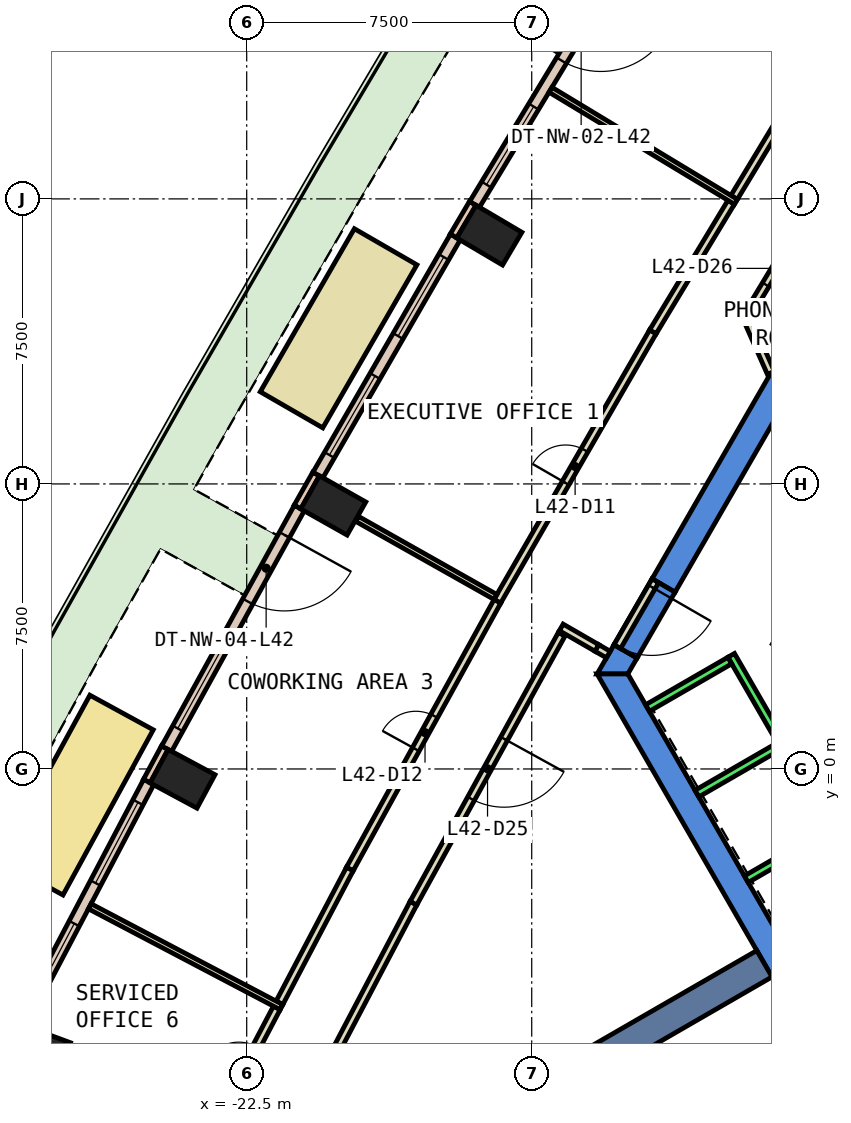
"""IFC4 building model, lengths in metres.
Left out: names, types, materials, properties, quantities, classifications, styles, units other than length and angle.
Written with IfcOpenShell. Run it as: python <this file> out.ifc"""

import sys

from ifc_helpers import new_model, si_unit, direction, frame, frame_2d, origin, origin_2d, place, context, subcontext, project, spatial, polyline, rectangle, outline, extrude, element, fill, save


model = new_model("IFC4")
c1 = context("Model", 3, precision=1e-05, world=origin(), true_north=direction((0.0, 1.0)))
c2 = subcontext(c1, "Body", "Model", "MODEL_VIEW")
j1 = project(units=[si_unit("LENGTHUNIT", "METRE"), si_unit("PLANEANGLEUNIT", "RADIAN")], contexts=[c1])
p1 = place(None, origin())
s1 = spatial("IfcSite", under=j1, at=p1, CompositionType="ELEMENT")
p2 = place(p1, origin())
s2 = spatial("IfcBuilding", under=s1, at=p2, CompositionType="ELEMENT")
p3 = place(p2, frame((0.0, 0.0, 189.8)))
s3 = spatial("IfcBuildingStorey", under=s2, at=p3, CompositionType="ELEMENT", Elevation=189.8)
for number, where, z_axis, x_axis in (
    (1, (-16.116, 14.046, 0.0), (0.0, 0.0, 1.0), (0.509, 0.861, 0.0)),
    (2, (-20.222, 6.934, 0.0), (0.0, 0.0, 1.0), (0.491, 0.871, 0.0)),
    (3, (-24.188, -0.259, 0.0), (0.0, 0.0, 1.0), (0.474, 0.88, 0.0)),
    (4, (-27.967, -7.429, 0.0), (0.0, 0.0, 1.0), (0.347, 0.938, 0.0)),
):
    element("IfcColumn", number, at=place(p3, frame(where, z_axis=z_axis, x_axis=x_axis)), inside=s3, PredefinedType="COLUMN", context=c2, shape_type="SweptSolid", body=[
        extrude(rectangle(XDim=1.0, YDim=1.4, at=origin_2d()), origin(), (0.0, 0.0, 1.0), 3.8),
    ])
p4 = place(p3, frame((0.0, 0.0, -0.6)))
e5 = element("IfcWall", 5, at=p4, inside=s3, PredefinedType="SHEAR", context=c2, shape_type="SweptSolid", body=[
    extrude(outline(polyline([(-11.834, 5.002), (-11.228, 4.652), (-6.235, 13.3), (-6.64, 14.0), (-11.834, 5.002)])), origin(), (0.0, 0.0, 1.0), 4.4),
])
p5 = place(p3, frame((0.0, 0.0, -0.6)))
e6 = element("IfcWall", 6, at=p5, inside=s3, PredefinedType="SHEAR", context=c2, shape_type="SweptSolid", body=[
    extrude(outline(polyline([(-12.228, 2.92), (-12.834, 3.27), (-13.279, 2.5), (-12.471, 2.5), (-12.228, 2.92)])), origin(), (0.0, 0.0, 1.0), 4.4),
])
p6 = place(p3, frame((0.0, 0.0, 3.6)))
e7 = element("IfcWall", 7, at=p6, inside=s3, PredefinedType="SHEAR", context=c2, shape_type="SweptSolid", body=[
    extrude(outline(polyline([(-12.834, 3.27), (-12.228, 2.92), (-11.228, 4.652), (-11.834, 5.002), (-12.834, 3.27)])), origin(), (0.0, 0.0, 1.0), 0.2),
])
p7 = place(p3, frame((0.0, 0.0, -0.6)))
e8 = element("IfcWall", 8, at=p7, inside=s3, PredefinedType="SHEAR", context=c2, shape_type="SweptSolid", body=[
    extrude(outline(polyline([(-13.279, 2.5), (-6.64, -9.0), (-6.235, -8.3), (-12.471, 2.5), (-13.279, 2.5)])), origin(), (0.0, 0.0, 1.0), 4.4),
])
p8 = place(p3, frame((-8.877, -5.125, -0.6), z_axis=(0.0, 0.0, 1.0), x_axis=(-0.866017533419, -0.500013631625, 0.0)))
e9 = element("IfcWall", 9, at=p8, inside=s3, PredefinedType="SHEAR", context=c2, shape_type="SweptSolid", body=[
    extrude(rectangle(XDim=9.0, YDim=0.8, at=frame_2d((4.5, 0.0))), origin(), (0.0, 0.0, 1.0), 4.4),
])
p9 = place(p3, frame((-16.551, 14.884, 0.0), z_axis=(0.0, 0.0, 1.0), x_axis=(-0.508161541526, -0.861261776531, 0.0)))
e10 = element("IfcWall", 10, at=p9, inside=s3, PredefinedType="STANDARD", context=c2, shape_type="SweptSolid", body=[
    extrude(rectangle(XDim=1.0, YDim=0.2, at=frame_2d((0.5, 0.0))), origin(), (0.0, 0.0, 1.0), 3.8),
])
p10 = place(p3, frame((-20.673, 7.762, 0.0), z_axis=(0.0, 0.0, 1.0), x_axis=(-0.491848119507, -0.870681013539, 0.0)))
e11 = element("IfcWall", 11, at=p10, inside=s3, PredefinedType="STANDARD", context=c2, shape_type="SweptSolid", body=[
    extrude(rectangle(XDim=1.0, YDim=0.2, at=frame_2d((0.5, 0.0))), origin(), (0.0, 0.0, 1.0), 3.8),
])
p11 = place(p3, frame((-24.655, 0.561, 0.0), z_axis=(0.0, 0.0, 1.0), x_axis=(-0.473663196434, -0.88070606694, 0.0)))
e12 = element("IfcWall", 12, at=p11, inside=s3, PredefinedType="STANDARD", context=c2, shape_type="SweptSolid", body=[
    extrude(rectangle(XDim=1.0, YDim=0.2, at=frame_2d((0.5, 0.0))), origin(), (0.0, 0.0, 1.0), 3.8),
])
p12 = place(p3, frame((-12.765, 21.043, 0.0), z_axis=(0.0, 0.0, 1.0), x_axis=(-0.517159962006, -0.855888762456, 0.0)))
e13 = element("IfcWall", 13, at=p12, inside=s3, PredefinedType="STANDARD", context=c2, shape_type="SweptSolid", body=[
    extrude(rectangle(XDim=7.23, YDim=0.3, at=frame_2d((3.615, 0.0))), origin(), (0.0, 0.0, 1.0), 3.8),
])
p13 = place(p12, frame((0.807, 0.0, 0.0)))
e14 = element("IfcOpeningElement", 14, at=p13, cuts=e13, PredefinedType="OPENING", context=c2, shape_type="SweptSolid", body=[
    extrude(rectangle(XDim=2.0, YDim=2.4, at=frame_2d((1.0, 1.2))), frame((0.0, 0.16, 0.0), z_axis=(0.0, -1.0, 0.0), x_axis=(1.0, 0.0, 0.0)), (0.0, 0.0, 1.0), 0.32),
])
p14 = place(p12, frame((4.222, 0.0, 0.9)))
e15 = element("IfcOpeningElement", 15, at=p14, cuts=e13, PredefinedType="OPENING", context=c2, shape_type="SweptSolid", body=[
    extrude(rectangle(XDim=2.4, YDim=2.6, at=frame_2d((1.2, 1.3))), frame((0.0, 0.16, 0.0), z_axis=(0.0, -1.0, 0.0), x_axis=(1.0, 0.0, 0.0)), (0.0, 0.0, 1.0), 0.32),
])
p15 = place(p3, frame((-17.011, 13.996, 0.0), z_axis=(0.0, 0.0, 1.0), x_axis=(-0.499948481376, -0.866055146033, 0.0)))
e16 = element("IfcWall", 16, at=p15, inside=s3, PredefinedType="STANDARD", context=c2, shape_type="SweptSolid", body=[
    extrude(rectangle(XDim=7.231, YDim=0.3, at=frame_2d((3.615, 0.0))), origin(), (0.0, 0.0, 1.0), 3.8),
])
p16 = place(p15, frame((0.608, 0.0, 0.9)))
e17 = element("IfcOpeningElement", 17, at=p16, cuts=e16, PredefinedType="OPENING", context=c2, shape_type="SweptSolid", body=[
    extrude(rectangle(XDim=2.4, YDim=2.6, at=frame_2d((1.2, 1.3))), frame((0.0, 0.16, 0.0), z_axis=(0.0, -1.0, 0.0), x_axis=(1.0, 0.0, 0.0)), (0.0, 0.0, 1.0), 0.32),
])
p17 = place(p15, frame((4.223, 0.0, 0.9)))
e18 = element("IfcOpeningElement", 18, at=p17, cuts=e16, PredefinedType="OPENING", context=c2, shape_type="SweptSolid", body=[
    extrude(rectangle(XDim=2.4, YDim=2.6, at=frame_2d((1.2, 1.3))), frame((0.0, 0.16, 0.0), z_axis=(0.0, -1.0, 0.0), x_axis=(1.0, 0.0, 0.0)), (0.0, 0.0, 1.0), 0.32),
])
p18 = place(p3, frame((-21.116, 6.865, 0.0), z_axis=(0.0, 0.0, 1.0), x_axis=(-0.482862185961, -0.875696356832, 0.0)))
e19 = element("IfcWall", 19, at=p18, inside=s3, PredefinedType="STANDARD", context=c2, shape_type="SweptSolid", body=[
    extrude(rectangle(XDim=7.23, YDim=0.3, at=frame_2d((3.615, 0.0))), origin(), (0.0, 0.0, 1.0), 3.8),
])
p19 = place(p18, frame((0.807, 0.0, 0.0)))
e20 = element("IfcOpeningElement", 20, at=p19, cuts=e19, PredefinedType="OPENING", context=c2, shape_type="SweptSolid", body=[
    extrude(rectangle(XDim=2.0, YDim=2.4, at=frame_2d((1.0, 1.2))), frame((0.0, 0.16, 0.0), z_axis=(0.0, -1.0, 0.0), x_axis=(1.0, 0.0, 0.0)), (0.0, 0.0, 1.0), 0.32),
])
p20 = place(p18, frame((4.222, 0.0, 0.9)))
e21 = element("IfcOpeningElement", 21, at=p20, cuts=e19, PredefinedType="OPENING", context=c2, shape_type="SweptSolid", body=[
    extrude(rectangle(XDim=2.4, YDim=2.6, at=frame_2d((1.2, 1.3))), frame((0.0, 0.16, 0.0), z_axis=(0.0, -1.0, 0.0), x_axis=(1.0, 0.0, 0.0)), (0.0, 0.0, 1.0), 0.32),
])
p21 = place(p3, frame((-25.08, -0.345, 0.0), z_axis=(0.0, 0.0, 1.0), x_axis=(-0.465478369088, -0.885059256723, 0.0)))
e22 = element("IfcWall", 22, at=p21, inside=s3, PredefinedType="STANDARD", context=c2, shape_type="SweptSolid", body=[
    extrude(rectangle(XDim=7.208, YDim=0.3, at=frame_2d((3.604, 0.0))), origin(), (0.0, 0.0, 1.0), 3.8),
])
p22 = place(p21, frame((0.602, 0.0, 0.9)))
e23 = element("IfcOpeningElement", 23, at=p22, cuts=e22, PredefinedType="OPENING", context=c2, shape_type="SweptSolid", body=[
    extrude(rectangle(XDim=2.4, YDim=2.6, at=frame_2d((1.2, 1.3))), frame((0.0, 0.16, 0.0), z_axis=(0.0, -1.0, 0.0), x_axis=(1.0, 0.0, 0.0)), (0.0, 0.0, 1.0), 0.32),
])
p23 = place(p21, frame((4.206, 0.0, 0.9)))
e24 = element("IfcOpeningElement", 24, at=p23, cuts=e22, PredefinedType="OPENING", context=c2, shape_type="SweptSolid", body=[
    extrude(rectangle(XDim=2.4, YDim=2.6, at=frame_2d((1.2, 1.3))), frame((0.0, 0.16, 0.0), z_axis=(0.0, -1.0, 0.0), x_axis=(1.0, 0.0, 0.0)), (0.0, 0.0, 1.0), 0.32),
])
p24 = place(p3, frame((-18.844, 13.74, 0.0), z_axis=(0.0, 0.0, 1.0), x_axis=(-0.500029609304, -0.86600830817, 0.0)))
e25 = element("IfcWall", 25, at=p24, inside=s3, PredefinedType="STANDARD", context=c2, shape_type="SweptSolid", body=[
    extrude(rectangle(XDim=4.954, YDim=1.9, at=frame_2d((2.477, 0.0))), origin(), (0.0, 0.0, 1.0), 0.8),
])
p25 = place(p3, frame((-25.793, 1.486, 0.0), z_axis=(0.0, 0.0, 1.0), x_axis=(-0.479445954257, -0.87757140846, 0.0)))
e26 = element("IfcWall", 26, at=p25, inside=s3, PredefinedType="STANDARD", context=c2, shape_type="SweptSolid", body=[
    extrude(rectangle(XDim=4.954, YDim=1.9, at=frame_2d((2.477, 0.0))), origin(), (0.0, 0.0, 1.0), 0.8),
])
p26 = place(p3, frame((-7.759, 14.536, 0.0), z_axis=(0.0, 0.0, 1.0), x_axis=(-0.516926279395, -0.856029918678, 0.0)))
e27 = element("IfcWall", 27, at=p26, inside=s3, PredefinedType="PARTITIONING", context=c2, shape_type="SweptSolid", body=[
    extrude(rectangle(XDim=3.188, YDim=0.2, at=frame_2d((1.594, 0.0))), origin(), (0.0, 0.0, 1.0), 3.8),
])
p27 = place(p26, frame((1.094, 0.0, 0.0)))
e28 = element("IfcOpeningElement", 28, at=p27, cuts=e27, PredefinedType="OPENING", context=c2, shape_type="SweptSolid", body=[
    extrude(rectangle(XDim=1.0, YDim=2.1, at=frame_2d((0.5, 1.05))), frame((0.0, 0.11, 0.0), z_axis=(0.0, -1.0, 0.0), x_axis=(1.0, 0.0, 0.0)), (0.0, 0.0, 1.0), 0.22),
])
p28 = place(p3, frame((-9.315, 11.801, 0.0), z_axis=(0.0, 0.0, 1.0), x_axis=(0.403943240321, -0.914784050254, 0.0)))
e29 = element("IfcWall", 29, at=p28, inside=s3, PredefinedType="PARTITIONING", context=c2, shape_type="SweptSolid", body=[
    extrude(rectangle(XDim=1.507, YDim=0.2, at=frame_2d((0.754, 0.0))), origin(), (0.0, 0.0, 1.0), 3.8),
])
p29 = place(p3, frame((-18.112, -3.531, 0.0), z_axis=(0.0, 0.0, 1.0), x_axis=(-0.465461327558, -0.885068219149, 0.0)))
e30 = element("IfcWall", 30, at=p29, inside=s3, PredefinedType="PARTITIONING", context=c2, shape_type="SweptSolid", body=[
    extrude(rectangle(XDim=7.236, YDim=0.2, at=frame_2d((3.618, 0.0))), origin(), (0.0, 0.0, 1.0), 3.8),
])
p30 = place(p3, frame((-12.984, 3.01, 0.0), z_axis=(0.0, 0.0, 1.0), x_axis=(-0.866046247233, 0.49996389635, 0.0)))
e31 = element("IfcWall", 31, at=p30, inside=s3, PredefinedType="PARTITIONING", context=c2, shape_type="SweptSolid", body=[
    extrude(rectangle(XDim=0.35, YDim=0.2, at=frame_2d((0.175, 0.0))), origin(), (0.0, 0.0, 1.0), 2.4),
])
p31 = place(p3, frame((-14.213, 3.543, 0.0), z_axis=(0.0, 0.0, 1.0), x_axis=(-0.482724934882, -0.875772023556, 0.0)))
e32 = element("IfcWall", 32, at=p31, inside=s3, PredefinedType="PARTITIONING", context=c2, shape_type="SweptSolid", body=[
    extrude(rectangle(XDim=8.077, YDim=0.2, at=frame_2d((4.039, 0.0))), origin(), (0.0, 0.0, 1.0), 3.8),
])
p32 = place(p31, frame((3.139, 0.0, 0.0)))
e33 = element("IfcOpeningElement", 33, at=p32, cuts=e32, PredefinedType="OPENING", context=c2, shape_type="SweptSolid", body=[
    extrude(rectangle(XDim=1.8, YDim=2.1, at=frame_2d((0.9, 1.05))), frame((0.0, 0.11, 0.0), z_axis=(0.0, -1.0, 0.0), x_axis=(1.0, 0.0, 0.0)), (0.0, 0.0, 1.0), 0.22),
])
p33 = place(p3, frame((-9.674, 15.039, 0.0), z_axis=(0.0, 0.0, 1.0), x_axis=(0.516918251554, 0.856034766356, 0.0)))
e34 = element("IfcWall", 34, at=p33, inside=s3, PredefinedType="PARTITIONING", context=c2, shape_type="SweptSolid", body=[
    extrude(rectangle(XDim=3.983, YDim=0.2, at=frame_2d((1.992, 0.0))), origin(), (0.0, 0.0, 1.0), 3.8),
])
p34 = place(p3, frame((-15.905, 4.412, 0.0), z_axis=(0.0, 0.0, 1.0), x_axis=(0.5000098125, 0.866019738461, 0.0)))
e35 = element("IfcWall", 35, at=p34, inside=s3, PredefinedType="PARTITIONING", context=c2, shape_type="SweptSolid", body=[
    extrude(rectangle(XDim=8.188, YDim=0.2, at=frame_2d((4.094, 0.0))), origin(), (0.0, 0.0, 1.0), 3.8),
])
p35 = place(p34, frame((3.594, 0.0, 0.0)))
e36 = element("IfcOpeningElement", 36, at=p35, cuts=e35, PredefinedType="OPENING", context=c2, shape_type="SweptSolid", body=[
    extrude(rectangle(XDim=1.0, YDim=2.1, at=frame_2d((0.5, 1.05))), frame((0.0, 0.11, 0.0), z_axis=(0.0, -1.0, 0.0), x_axis=(1.0, 0.0, 0.0)), (0.0, 0.0, 1.0), 0.22),
])
for number, where, z_axis, x_axis in (
    (37, (-11.811, 11.503, 0.0), (0.0, 0.0, 1.0), (0.517, 0.856, 0.0)),
    (38, (-21.638, -6.154, 0.0), (0.0, 0.0, 1.0), (0.465, 0.885, 0.0)),
):
    element("IfcWall", number, at=place(p3, frame(where, z_axis=z_axis, x_axis=x_axis)), inside=s3, PredefinedType="PARTITIONING", context=c2, shape_type="SweptSolid", body=[
        extrude(rectangle(XDim=3.982, YDim=0.2, at=frame_2d((1.991, 0.0))), origin(), (0.0, 0.0, 1.0), 3.8),
    ])
p36 = place(p3, frame((-19.785, -2.63, 0.0), z_axis=(0.0, 0.0, 1.0), x_axis=(0.482817232578, 0.875721142788, 0.0)))
e39 = element("IfcWall", 39, at=p36, inside=s3, PredefinedType="PARTITIONING", context=c2, shape_type="SweptSolid", body=[
    extrude(rectangle(XDim=8.04, YDim=0.2, at=frame_2d((4.02, 0.0))), origin(), (0.0, 0.0, 1.0), 3.8),
])
p37 = place(p36, frame((3.595, 0.0, 0.0)))
e40 = element("IfcOpeningElement", 40, at=p37, cuts=e39, PredefinedType="OPENING", context=c2, shape_type="SweptSolid", body=[
    extrude(rectangle(XDim=1.0, YDim=2.1, at=frame_2d((0.5, 1.05))), frame((0.0, 0.11, 0.0), z_axis=(0.0, -1.0, 0.0), x_axis=(1.0, 0.0, 0.0)), (0.0, 0.0, 1.0), 0.22),
])
p38 = place(p3, frame((-23.242, -9.204, 0.0), z_axis=(0.0, 0.0, 1.0), x_axis=(0.465431933571, 0.885083676955, 0.0)))
e41 = element("IfcWall", 41, at=p38, inside=s3, PredefinedType="PARTITIONING", context=c2, shape_type="SweptSolid", body=[
    extrude(rectangle(XDim=3.296, YDim=0.2, at=frame_2d((1.648, 0.0))), origin(), (0.0, 0.0, 1.0), 3.8),
])
p39 = place(p38, frame((1.148, 0.0, 0.0)))
e42 = element("IfcOpeningElement", 42, at=p39, cuts=e41, PredefinedType="OPENING", context=c2, shape_type="SweptSolid", body=[
    extrude(rectangle(XDim=1.0, YDim=2.1, at=frame_2d((0.5, 1.05))), frame((0.0, 0.11, 0.0), z_axis=(0.0, -1.0, 0.0), x_axis=(1.0, 0.0, 0.0)), (0.0, 0.0, 1.0), 0.22),
])
p40 = place(p3, frame((-9.628, 14.924, 0.0), z_axis=(0.0, 0.0, 1.0), x_axis=(-0.855931736607, 0.517088834021, 0.0)))
e43 = element("IfcWall", 43, at=p40, inside=s3, PredefinedType="PARTITIONING", context=c2, shape_type="SweptSolid", body=[
    extrude(rectangle(XDim=5.699, YDim=0.15, at=frame_2d((2.85, 0.0))), origin(), (0.0, 0.0, 1.0), 3.8),
])
p41 = place(p3, frame((-15.954, 4.526, 0.0), z_axis=(0.0, 0.0, 1.0), x_axis=(-0.870940016277, 0.491389344663, 0.0)))
e44 = element("IfcWall", 44, at=p41, inside=s3, PredefinedType="PARTITIONING", context=c2, shape_type="SweptSolid", body=[
    extrude(rectangle(XDim=4.18, YDim=0.15, at=frame_2d((2.09, 0.0))), origin(), (0.0, 0.0, 1.0), 3.8),
])
p42 = place(p3, frame((-21.585, -6.267, 0.0), z_axis=(0.0, 0.0, 1.0), x_axis=(-0.885073333504, 0.465451602554, 0.0)))
e45 = element("IfcWall", 45, at=p42, inside=s3, PredefinedType="PARTITIONING", context=c2, shape_type="SweptSolid", body=[
    extrude(rectangle(XDim=5.7, YDim=0.15, at=frame_2d((2.85, 0.0))), origin(), (0.0, 0.0, 1.0), 3.8),
])
p43 = place(p3, frame((-11.747, 4.952, 0.0), z_axis=(0.0, 0.0, 1.0), x_axis=(-0.50002537861, -0.866010750942, 0.0)))
e46 = element("IfcWall", 46, at=p43, inside=s3, PredefinedType="PARTITIONING", context=c2, shape_type="SweptSolid", body=[
    extrude(rectangle(XDim=2.0, YDim=0.2, at=frame_2d((1.0, 0.0))), origin(), (0.0, 0.0, 1.0), 2.4),
])
p44 = place(p43, frame((0.19, 0.0, 0.0)))
e47 = element("IfcOpeningElement", 47, at=p44, cuts=e46, PredefinedType="OPENING", context=c2, shape_type="SweptSolid", body=[
    extrude(rectangle(XDim=1.8, YDim=2.1, at=frame_2d((0.9, 1.05))), frame((0.0, 0.11, 0.0), z_axis=(0.0, -1.0, 0.0), x_axis=(1.0, 0.0, 0.0)), (0.0, 0.0, 1.0), 0.22),
])
p45 = place(p3, frame((-13.287, 3.185, 0.0), z_axis=(0.0, 0.0, 1.0), x_axis=(-0.866121626761, 0.499833299868, 0.0)))
e48 = element("IfcWall", 48, at=p45, inside=s3, PredefinedType="PARTITIONING", context=c2, shape_type="SweptSolid", body=[
    extrude(rectangle(XDim=1.08, YDim=0.2, at=frame_2d((0.54, 0.0))), origin(), (0.0, 0.0, 1.0), 3.8),
])
p46 = place(p3, frame((-9.751, 2.99, 0.0), z_axis=(0.0, 0.0, 1.0), x_axis=(0.50000090737, -0.866024879913, 0.0)))
e49 = element("IfcWall", 49, at=p46, inside=s3, PredefinedType="STANDARD", context=c2, shape_type="SweptSolid", body=[
    extrude(rectangle(XDim=10.6, YDim=0.2, at=frame_2d((5.3, 0.0))), origin(), (0.0, 0.0, 1.0), 3.8),
])
p47 = place(p3, frame((-9.788, 2.853, 0.0), z_axis=(0.0, 0.0, 1.0), x_axis=(-0.865998541277, -0.500046524342, 0.0)))
e50 = element("IfcWall", 50, at=p47, inside=s3, PredefinedType="STANDARD", context=c2, shape_type="SweptSolid", body=[
    extrude(rectangle(XDim=2.5, YDim=0.2, at=frame_2d((1.25, 0.0))), origin(), (0.0, 0.0, 1.0), 3.8),
])
for number, where, z_axis, x_axis in (
    (51, (-8.488, 0.602, 0.0), (0.0, 0.0, 1.0), (-0.866, -0.5, 0.0)),
    (52, (-7.188, -1.65, 0.0), (0.0, 0.0, 1.0), (-0.866, -0.5, 0.0)),
):
    element("IfcWall", number, at=place(p3, frame(where, z_axis=z_axis, x_axis=x_axis)), inside=s3, PredefinedType="STANDARD", context=c2, shape_type="SweptSolid", body=[
        extrude(rectangle(XDim=2.5, YDim=0.2, at=frame_2d((1.25, 0.0))), origin(), (0.0, 0.0, 1.0), 3.8),
    ])
p48 = place(p13, origin())
e53 = element("IfcDoor", 53, at=p48, inside=s3, OperationType="SLIDING_TO_LEFT", PredefinedType="DOOR", context=c2, shape_type="SweptSolid", body=[
    extrude(rectangle(XDim=2.0, YDim=2.4, at=frame_2d((1.0, 1.2))), frame((0.0, 0.025, 0.0), z_axis=(0.0, -1.0, 0.0), x_axis=(1.0, 0.0, 0.0)), (0.0, 0.0, 1.0), 0.05),
])
fill(e14, e53)
p49 = place(p14, origin())
e54 = element("IfcWindow", 54, at=p49, inside=s3, PartitioningType="SINGLE_PANEL", PredefinedType="WINDOW", context=c2, shape_type="SweptSolid", body=[
    extrude(rectangle(XDim=2.4, YDim=2.6, at=frame_2d((1.2, 1.3))), frame((0.0, 0.03, 0.0), z_axis=(0.0, -1.0, 0.0), x_axis=(1.0, 0.0, 0.0)), (0.0, 0.0, 1.0), 0.06),
])
fill(e15, e54)
p50 = place(p16, origin())
e55 = element("IfcWindow", 55, at=p50, inside=s3, PartitioningType="SINGLE_PANEL", PredefinedType="WINDOW", context=c2, shape_type="SweptSolid", body=[
    extrude(rectangle(XDim=2.4, YDim=2.6, at=frame_2d((1.2, 1.3))), frame((0.0, 0.03, 0.0), z_axis=(0.0, -1.0, 0.0), x_axis=(1.0, 0.0, 0.0)), (0.0, 0.0, 1.0), 0.06),
])
fill(e17, e55)
p51 = place(p17, origin())
e56 = element("IfcWindow", 56, at=p51, inside=s3, PartitioningType="SINGLE_PANEL", PredefinedType="WINDOW", context=c2, shape_type="SweptSolid", body=[
    extrude(rectangle(XDim=2.4, YDim=2.6, at=frame_2d((1.2, 1.3))), frame((0.0, 0.03, 0.0), z_axis=(0.0, -1.0, 0.0), x_axis=(1.0, 0.0, 0.0)), (0.0, 0.0, 1.0), 0.06),
])
fill(e18, e56)
p52 = place(p19, origin())
e57 = element("IfcDoor", 57, at=p52, inside=s3, OperationType="SLIDING_TO_LEFT", PredefinedType="DOOR", context=c2, shape_type="SweptSolid", body=[
    extrude(rectangle(XDim=2.0, YDim=2.4, at=frame_2d((1.0, 1.2))), frame((0.0, 0.025, 0.0), z_axis=(0.0, -1.0, 0.0), x_axis=(1.0, 0.0, 0.0)), (0.0, 0.0, 1.0), 0.05),
])
fill(e20, e57)
p53 = place(p20, origin())
e58 = element("IfcWindow", 58, at=p53, inside=s3, PartitioningType="SINGLE_PANEL", PredefinedType="WINDOW", context=c2, shape_type="SweptSolid", body=[
    extrude(rectangle(XDim=2.4, YDim=2.6, at=frame_2d((1.2, 1.3))), frame((0.0, 0.03, 0.0), z_axis=(0.0, -1.0, 0.0), x_axis=(1.0, 0.0, 0.0)), (0.0, 0.0, 1.0), 0.06),
])
fill(e21, e58)
p54 = place(p22, origin())
e59 = element("IfcWindow", 59, at=p54, inside=s3, PartitioningType="SINGLE_PANEL", PredefinedType="WINDOW", context=c2, shape_type="SweptSolid", body=[
    extrude(rectangle(XDim=2.4, YDim=2.6, at=frame_2d((1.2, 1.3))), frame((0.0, 0.03, 0.0), z_axis=(0.0, -1.0, 0.0), x_axis=(1.0, 0.0, 0.0)), (0.0, 0.0, 1.0), 0.06),
])
fill(e23, e59)
p55 = place(p23, origin())
e60 = element("IfcWindow", 60, at=p55, inside=s3, PartitioningType="SINGLE_PANEL", PredefinedType="WINDOW", context=c2, shape_type="SweptSolid", body=[
    extrude(rectangle(XDim=2.4, YDim=2.6, at=frame_2d((1.2, 1.3))), frame((0.0, 0.03, 0.0), z_axis=(0.0, -1.0, 0.0), x_axis=(1.0, 0.0, 0.0)), (0.0, 0.0, 1.0), 0.06),
])
fill(e24, e60)
p56 = place(p35, origin())
e61 = element("IfcDoor", 61, at=p56, inside=s3, OperationType="SINGLE_SWING_LEFT", PredefinedType="DOOR", context=c2, shape_type="SweptSolid", body=[
    extrude(rectangle(XDim=1.0, YDim=2.1, at=frame_2d((0.5, 1.05))), frame((0.0, 0.025, 0.0), z_axis=(0.0, -1.0, 0.0), x_axis=(1.0, 0.0, 0.0)), (0.0, 0.0, 1.0), 0.05),
])
fill(e36, e61)
p57 = place(p37, origin())
e62 = element("IfcDoor", 62, at=p57, inside=s3, OperationType="SINGLE_SWING_LEFT", PredefinedType="DOOR", context=c2, shape_type="SweptSolid", body=[
    extrude(rectangle(XDim=1.0, YDim=2.1, at=frame_2d((0.5, 1.05))), frame((0.0, 0.025, 0.0), z_axis=(0.0, -1.0, 0.0), x_axis=(1.0, 0.0, 0.0)), (0.0, 0.0, 1.0), 0.05),
])
fill(e40, e62)
p58 = place(p32, origin())
e63 = element("IfcDoor", 63, at=p58, inside=s3, OperationType="DOUBLE_DOOR_SINGLE_SWING", PredefinedType="DOOR", context=c2, shape_type="SweptSolid", body=[
    extrude(rectangle(XDim=1.8, YDim=2.1, at=frame_2d((0.9, 1.05))), frame((0.0, 0.025, 0.0), z_axis=(0.0, -1.0, 0.0), x_axis=(1.0, 0.0, 0.0)), (0.0, 0.0, 1.0), 0.05),
])
fill(e33, e63)
p59 = place(p27, origin())
e64 = element("IfcDoor", 64, at=p59, inside=s3, OperationType="SINGLE_SWING_LEFT", PredefinedType="DOOR", context=c2, shape_type="SweptSolid", body=[
    extrude(rectangle(XDim=1.0, YDim=2.1, at=frame_2d((0.5, 1.05))), frame((0.0, 0.025, 0.0), z_axis=(0.0, -1.0, 0.0), x_axis=(1.0, 0.0, 0.0)), (0.0, 0.0, 1.0), 0.05),
])
fill(e28, e64)
p60 = place(p44, origin())
e65 = element("IfcDoor", 65, at=p60, inside=s3, OperationType="DOUBLE_DOOR_SINGLE_SWING", PredefinedType="DOOR", context=c2, shape_type="SweptSolid", body=[
    extrude(rectangle(XDim=1.8, YDim=2.1, at=frame_2d((0.9, 1.05))), frame((0.0, 0.025, 0.0), z_axis=(0.0, -1.0, 0.0), x_axis=(1.0, 0.0, 0.0)), (0.0, 0.0, 1.0), 0.05),
])
fill(e47, e65)
save(model, sys.argv[1])
